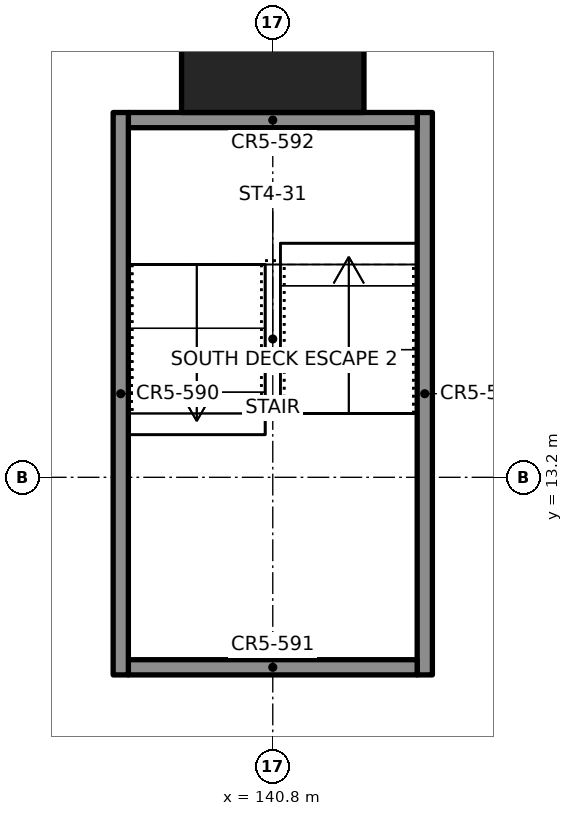
"""IFC4 building model, lengths in metres.
Left out: names, types, materials, properties, quantities, classifications, styles, units other than length and angle.
Written with IfcOpenShell. Run it as: python <this file> out.ifc"""

import sys

from ifc_helpers import new_model, si_unit, direction, frame, frame_2d, origin, origin_2d, place, context, subcontext, project, spatial, rectangle, extrude, element, save


model = new_model("IFC4")
c1 = context("Model", 3, precision=1e-05, world=origin(), true_north=direction((0.0, 1.0)))
c2 = subcontext(c1, "Body", "Model", "MODEL_VIEW")
j1 = project(units=[si_unit("LENGTHUNIT", "METRE"), si_unit("PLANEANGLEUNIT", "RADIAN")], contexts=[c1])
p1 = place(None, origin())
s1 = spatial("IfcSite", under=j1, at=p1, CompositionType="ELEMENT")
p2 = place(p1, origin())
s2 = spatial("IfcBuilding", under=s1, at=p2, CompositionType="ELEMENT")
p3 = place(p2, frame((0.0, 0.0, 8.8)))
s3 = spatial("IfcBuildingStorey", under=s2, at=p3, CompositionType="ELEMENT", Elevation=8.8)
p4 = place(p3, frame((140.8, 19.2, 0.0), z_axis=(0.0, 0.0, 1.0), x_axis=(1.0, 0.0, 0.0)))
e1 = element("IfcColumn", 1, at=p4, inside=s3, PredefinedType="COLUMN", context=c2, shape_type="SweptSolid", body=[
    extrude(rectangle(XDim=2.4, YDim=2.4, at=origin_2d()), origin(), (0.0, 0.0, 1.0), 3.65),
])
for number, where, z_axis, x_axis in (
    (2, (138.8, 10.6, 0.0), (0.0, 0.0, 1.0), (0.0, 1.0, 0.0)),
    (3, (142.8, 18.0, 0.0), (0.0, 0.0, 1.0), (0.0, -1.0, 0.0)),
):
    element("IfcWall", number, at=place(p3, frame(where, z_axis=z_axis, x_axis=x_axis)), inside=s3, PredefinedType="SOLIDWALL", context=c2, shape_type="SweptSolid", body=[
        extrude(rectangle(XDim=7.4, YDim=0.2, at=frame_2d((3.7, 0.0))), origin(), (0.0, 0.0, 1.0), 5.2),
    ])
for number, where, z_axis, x_axis in (
    (4, (138.9, 10.7, 0.0), (0.0, 0.0, 1.0), (1.0, 0.0, 0.0)),
    (5, (138.9, 17.9, 0.0), (0.0, 0.0, 1.0), (1.0, 0.0, 0.0)),
):
    element("IfcWall", number, at=place(p3, frame(where, z_axis=z_axis, x_axis=x_axis)), inside=s3, PredefinedType="SOLIDWALL", context=c2, shape_type="SweptSolid", body=[
        extrude(rectangle(XDim=3.8, YDim=0.2, at=frame_2d((1.9, 0.0))), origin(), (0.0, 0.0, 1.0), 5.2),
    ])
save(model, sys.argv[1])
